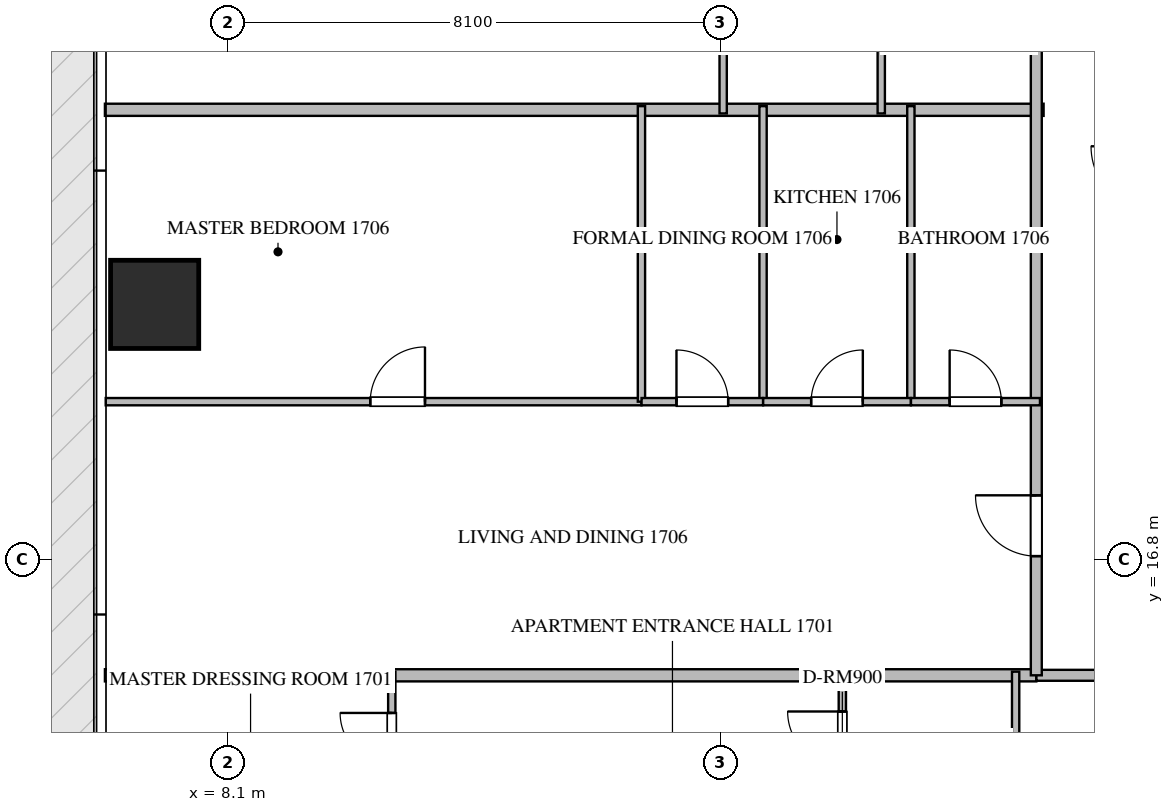
"""IFC4 building model, lengths in metres.
Left out: names, types, materials, properties, quantities, classifications, styles, units other than length and angle.
Written with IfcOpenShell. Run it as: python <this file> out.ifc"""

import sys

from ifc_helpers import new_model, si_unit, direction, frame, frame_2d, origin, origin_2d, place, context, subcontext, project, spatial, rectangle, extrude, source, transform, mapped, element, fill, save


model = new_model("IFC4")
c1 = context("Model", 3, precision=1e-05, world=origin(), true_north=direction((0.0, 1.0)))
c2 = subcontext(c1, "Body", "Model", "MODEL_VIEW")
j1 = project(units=[si_unit("LENGTHUNIT", "METRE"), si_unit("PLANEANGLEUNIT", "RADIAN")], contexts=[c1])
p1 = place(None, origin())
s1 = spatial("IfcSite", under=j1, at=p1, CompositionType="ELEMENT")
p2 = place(p1, origin())
s2 = spatial("IfcBuilding", under=s1, at=p2, CompositionType="ELEMENT")
p3 = place(p2, frame((0.0, 0.0, 71.7)))
s3 = spatial("IfcBuildingStorey", under=s2, at=p3, CompositionType="ELEMENT", Elevation=71.7)
m1 = source(origin(), c2, "Body", "SweptSolid", [
    extrude(rectangle(XDim=1.45, YDim=1.45, at=origin_2d()), origin(), (0.0, 0.0, 1.0), 3.75),
])
p4 = place(p3, frame((6.9, 21.0, -0.26), z_axis=(0.0, 0.0, 1.0), x_axis=(1.0, 0.0, 0.0)))
e1 = element("IfcColumn", 1, at=p4, inside=s3, PredefinedType="COLUMN", context=c2, shape_type="MappedRepresentation", body=[
    mapped(m1, transform((0.0, 0.0, 0.0), scale=1.0)),
])
p5 = place(p3, frame((6.082, 24.2, 0.0), z_axis=(0.0, 0.0, 1.0), x_axis=(1.0, 0.0, 0.0)))
e2 = element("IfcWall", 2, at=p5, inside=s3, PredefinedType="PARTITIONING", context=c2, shape_type="SweptSolid", body=[
    extrude(rectangle(XDim=15.438, YDim=0.2, at=frame_2d((7.719, 0.0))), origin(), (0.0, 0.0, 1.0), 3.49),
])
p6 = place(p3, frame((6.082, 14.9, 0.0), z_axis=(0.0, 0.0, 1.0), x_axis=(1.0, 0.0, 0.0)))
e3 = element("IfcWall", 3, at=p6, inside=s3, PredefinedType="PARTITIONING", context=c2, shape_type="SweptSolid", body=[
    extrude(rectangle(XDim=15.318, YDim=0.2, at=frame_2d((7.659, 0.0))), origin(), (0.0, 0.0, 1.0), 3.49),
])
p7 = place(p3, frame((21.402, 14.9, 0.0), z_axis=(0.0, 0.0, 1.0), x_axis=(1.0, 0.0, 0.0)))
e4 = element("IfcWall", 4, at=p7, inside=s3, PredefinedType="PARTITIONING", context=c2, shape_type="SweptSolid", body=[
    extrude(rectangle(XDim=21.996, YDim=0.18, at=frame_2d((10.998, 0.0))), origin(), (0.0, 0.0, 1.0), 3.49),
])
p8 = place(p7, frame((2.1, 0.0, 0.0)))
e5 = element("IfcOpeningElement", 5, at=p8, cuts=e4, PredefinedType="OPENING", context=c2, shape_type="SweptSolid", body=[
    extrude(rectangle(XDim=1.0, YDim=2.15, at=frame_2d((0.5, 1.075))), frame((0.0, 0.1, 0.0), z_axis=(0.0, -1.0, 0.0), x_axis=(1.0, 0.0, 0.0)), (0.0, 0.0, 1.0), 0.2),
])
p9 = place(p7, frame((6.173, 0.0, 0.0)))
e6 = element("IfcOpeningElement", 6, at=p9, cuts=e4, PredefinedType="OPENING", context=c2, shape_type="SweptSolid", body=[
    extrude(rectangle(XDim=1.0, YDim=2.15, at=frame_2d((0.5, 1.075))), frame((0.0, 0.1, 0.0), z_axis=(0.0, -1.0, 0.0), x_axis=(1.0, 0.0, 0.0)), (0.0, 0.0, 1.0), 0.2),
])
p10 = place(p7, frame((18.896, 0.0, 0.0)))
e7 = element("IfcOpeningElement", 7, at=p10, cuts=e4, PredefinedType="OPENING", context=c2, shape_type="SweptSolid", body=[
    extrude(rectangle(XDim=1.0, YDim=2.15, at=frame_2d((0.5, 1.075))), frame((0.0, 0.1, 0.0), z_axis=(0.0, -1.0, 0.0), x_axis=(1.0, 0.0, 0.0)), (0.0, 0.0, 1.0), 0.2),
])
p11 = place(p3, frame((21.4, 14.9, 0.0), z_axis=(0.0, 0.0, 1.0), x_axis=(0.0, 1.0, 0.0)))
e8 = element("IfcWall", 8, at=p11, inside=s3, PredefinedType="PARTITIONING", context=c2, shape_type="SweptSolid", body=[
    extrude(rectangle(XDim=20.6, YDim=0.18, at=frame_2d((10.3, 0.0))), origin(), (0.0, 0.0, 1.0), 3.49),
])
p12 = place(p11, frame((1.96, 0.0, 0.0)))
e9 = element("IfcOpeningElement", 9, at=p12, cuts=e8, PredefinedType="OPENING", context=c2, shape_type="SweptSolid", body=[
    extrude(rectangle(XDim=1.0, YDim=2.15, at=frame_2d((0.5, 1.075))), frame((0.0, 0.1, 0.0), z_axis=(0.0, -1.0, 0.0), x_axis=(1.0, 0.0, 0.0)), (0.0, 0.0, 1.0), 0.2),
])
p13 = place(p11, frame((15.778, 0.0, 0.0)))
e10 = element("IfcOpeningElement", 10, at=p13, cuts=e8, PredefinedType="OPENING", context=c2, shape_type="SweptSolid", body=[
    extrude(rectangle(XDim=1.0, YDim=2.15, at=frame_2d((0.5, 1.075))), frame((0.0, 0.1, 0.0), z_axis=(0.0, -1.0, 0.0), x_axis=(1.0, 0.0, 0.0)), (0.0, 0.0, 1.0), 0.2),
])
p14 = place(p3, frame((21.06, 12.15, 0.0), z_axis=(0.0, 0.0, 1.0), x_axis=(0.0, 1.0, 0.0)))
e11 = element("IfcWall", 11, at=p14, inside=s3, PredefinedType="PARTITIONING", context=c2, shape_type="SweptSolid", body=[
    extrude(rectangle(XDim=2.81, YDim=0.12, at=frame_2d((1.405, 0.0))), origin(), (0.0, 0.0, 1.0), 3.49),
])
p15 = place(p3, frame((18.21, 12.75, 0.0), z_axis=(0.0, 0.0, 1.0), x_axis=(0.0, 1.0, 0.0)))
e12 = element("IfcWall", 12, at=p15, inside=s3, PredefinedType="PARTITIONING", context=c2, shape_type="SweptSolid", body=[
    extrude(rectangle(XDim=2.21, YDim=0.12, at=frame_2d((1.105, 0.0))), origin(), (0.0, 0.0, 1.0), 3.49),
])
p16 = place(p15, frame((0.655, 0.0, 0.0)))
e13 = element("IfcOpeningElement", 13, at=p16, cuts=e12, PredefinedType="OPENING", context=c2, shape_type="SweptSolid", body=[
    extrude(rectangle(XDim=0.9, YDim=2.1, at=frame_2d((0.45, 1.05))), frame((0.0, 0.07, 0.0), z_axis=(0.0, -1.0, 0.0), x_axis=(1.0, 0.0, 0.0)), (0.0, 0.0, 1.0), 0.14),
])
p17 = place(p3, frame((10.8, 12.752, 0.0), z_axis=(0.0, 0.0, 1.0), x_axis=(0.0, 1.0, 0.0)))
e14 = element("IfcWall", 14, at=p17, inside=s3, PredefinedType="PARTITIONING", context=c2, shape_type="SweptSolid", body=[
    extrude(rectangle(XDim=2.208, YDim=0.12, at=frame_2d((1.104, 0.0))), origin(), (0.0, 0.0, 1.0), 3.49),
])
p18 = place(p17, frame((0.679, 0.0, 0.0)))
e15 = element("IfcOpeningElement", 15, at=p18, cuts=e14, PredefinedType="OPENING", context=c2, shape_type="SweptSolid", body=[
    extrude(rectangle(XDim=0.85, YDim=2.1, at=frame_2d((0.425, 1.05))), frame((0.0, 0.07, 0.0), z_axis=(0.0, -1.0, 0.0), x_axis=(1.0, 0.0, 0.0)), (0.0, 0.0, 1.0), 0.14),
])
p19 = place(p3, frame((6.095, 19.4, 0.0), z_axis=(0.0, 0.0, 1.0), x_axis=(1.0, 0.0, 0.0)))
e16 = element("IfcWall", 16, at=p19, inside=s3, PredefinedType="PARTITIONING", context=c2, shape_type="SweptSolid", body=[
    extrude(rectangle(XDim=8.811, YDim=0.12, at=frame_2d((4.406, 0.0))), origin(), (0.0, 0.0, 1.0), 3.49),
])
p20 = place(p19, frame((4.351, 0.0, 0.0)))
e17 = element("IfcOpeningElement", 17, at=p20, cuts=e16, PredefinedType="OPENING", context=c2, shape_type="SweptSolid", body=[
    extrude(rectangle(XDim=0.9, YDim=2.1, at=frame_2d((0.45, 1.05))), frame((0.0, 0.07, 0.0), z_axis=(0.0, -1.0, 0.0), x_axis=(1.0, 0.0, 0.0)), (0.0, 0.0, 1.0), 0.14),
])
for number, where, z_axis, x_axis in (
    (18, (14.906, 19.4, 0.0), (0.0, 0.0, 1.0), (0.0, 1.0, 0.0)),
    (19, (16.906, 19.4, 0.0), (0.0, 0.0, 1.0), (0.0, 1.0, 0.0)),
    (20, (19.337, 19.4, 0.0), (0.0, 0.0, 1.0), (0.0, 1.0, 0.0)),
):
    element("IfcWall", number, at=place(p3, frame(where, z_axis=z_axis, x_axis=x_axis)), inside=s3, PredefinedType="PARTITIONING", context=c2, shape_type="SweptSolid", body=[
        extrude(rectangle(XDim=4.86, YDim=0.12, at=frame_2d((2.43, 0.0))), origin(), (0.0, 0.0, 1.0), 3.49),
    ])
p21 = place(p3, frame((14.908, 19.4, 0.0), z_axis=(0.0, 0.0, 1.0), x_axis=(1.0, 0.0, 0.0)))
e21 = element("IfcWall", 21, at=p21, inside=s3, PredefinedType="PARTITIONING", context=c2, shape_type="SweptSolid", body=[
    extrude(rectangle(XDim=1.998, YDim=0.12, at=frame_2d((0.999, 0.0))), origin(), (0.0, 0.0, 1.0), 3.49),
])
p22 = place(p21, frame((0.574, 0.0, 0.0)))
e22 = element("IfcOpeningElement", 22, at=p22, cuts=e21, PredefinedType="OPENING", context=c2, shape_type="SweptSolid", body=[
    extrude(rectangle(XDim=0.85, YDim=2.1, at=frame_2d((0.425, 1.05))), frame((0.0, 0.07, 0.0), z_axis=(0.0, -1.0, 0.0), x_axis=(1.0, 0.0, 0.0)), (0.0, 0.0, 1.0), 0.14),
])
p23 = place(p3, frame((16.908, 19.4, 0.0), z_axis=(0.0, 0.0, 1.0), x_axis=(1.0, 0.0, 0.0)))
e23 = element("IfcWall", 23, at=p23, inside=s3, PredefinedType="PARTITIONING", context=c2, shape_type="SweptSolid", body=[
    extrude(rectangle(XDim=2.429, YDim=0.12, at=frame_2d((1.214, 0.0))), origin(), (0.0, 0.0, 1.0), 3.49),
])
p24 = place(p23, frame((0.789, 0.0, 0.0)))
e24 = element("IfcOpeningElement", 24, at=p24, cuts=e23, PredefinedType="OPENING", context=c2, shape_type="SweptSolid", body=[
    extrude(rectangle(XDim=0.85, YDim=2.1, at=frame_2d((0.425, 1.05))), frame((0.0, 0.07, 0.0), z_axis=(0.0, -1.0, 0.0), x_axis=(1.0, 0.0, 0.0)), (0.0, 0.0, 1.0), 0.14),
])
p25 = place(p3, frame((19.339, 19.4, 0.0), z_axis=(0.0, 0.0, 1.0), x_axis=(1.0, 0.0, 0.0)))
e25 = element("IfcWall", 25, at=p25, inside=s3, PredefinedType="PARTITIONING", context=c2, shape_type="SweptSolid", body=[
    extrude(rectangle(XDim=2.121, YDim=0.12, at=frame_2d((1.061, 0.0))), origin(), (0.0, 0.0, 1.0), 3.49),
])
p26 = place(p25, frame((0.636, 0.0, 0.0)))
e26 = element("IfcOpeningElement", 26, at=p26, cuts=e25, PredefinedType="OPENING", context=c2, shape_type="SweptSolid", body=[
    extrude(rectangle(XDim=0.85, YDim=2.1, at=frame_2d((0.425, 1.05))), frame((0.0, 0.07, 0.0), z_axis=(0.0, -1.0, 0.0), x_axis=(1.0, 0.0, 0.0)), (0.0, 0.0, 1.0), 0.14),
])
for number, where, z_axis, x_axis in (
    (27, (18.85, 24.14, 0.0), (0.0, 0.0, 1.0), (0.0, 1.0, 0.0)),
    (28, (16.25, 24.14, 0.0), (0.0, 0.0, 1.0), (0.0, 1.0, 0.0)),
):
    element("IfcWall", number, at=place(p3, frame(where, z_axis=z_axis, x_axis=x_axis)), inside=s3, PredefinedType="PARTITIONING", context=c2, shape_type="SweptSolid", body=[
        extrude(rectangle(XDim=2.81, YDim=0.12, at=frame_2d((1.405, 0.0))), origin(), (0.0, 0.0, 1.0), 3.49),
    ])
m2 = source(origin(), c2, "Body", "SweptSolid", [
    extrude(rectangle(XDim=1.0, YDim=2.15, at=frame_2d((0.5, 1.075))), frame((0.0, 0.025, 0.0), z_axis=(0.0, -1.0, 0.0), x_axis=(1.0, 0.0, 0.0)), (0.0, 0.0, 1.0), 0.05),
])
p27 = place(p12, origin())
e29 = element("IfcDoor", 29, at=p27, inside=s3, OperationType="SINGLE_SWING_RIGHT", PredefinedType="DOOR", context=c2, shape_type="MappedRepresentation", body=[
    mapped(m2, transform((0.0, 0.0, 0.0), scale=1.0)),
])
fill(e9, e29)
m3 = source(origin(), c2, "Body", "SweptSolid", [
    extrude(rectangle(XDim=0.9, YDim=2.1, at=frame_2d((0.45, 1.05))), frame((0.0, 0.025, 0.0), z_axis=(0.0, -1.0, 0.0), x_axis=(1.0, 0.0, 0.0)), (0.0, 0.0, 1.0), 0.05),
])
p28 = place(p16, origin())
e30 = element("IfcDoor", 30, at=p28, inside=s3, OperationType="SINGLE_SWING_RIGHT", PredefinedType="DOOR", context=c2, shape_type="MappedRepresentation", body=[
    mapped(m3, transform((0.0, 0.0, 0.0), scale=1.0)),
])
fill(e13, e30)
m4 = source(origin(), c2, "Body", "SweptSolid", [
    extrude(rectangle(XDim=0.85, YDim=2.1, at=frame_2d((0.425, 1.05))), frame((0.0, 0.025, 0.0), z_axis=(0.0, -1.0, 0.0), x_axis=(1.0, 0.0, 0.0)), (0.0, 0.0, 1.0), 0.05),
])
p29 = place(p18, origin())
e31 = element("IfcDoor", 31, at=p29, inside=s3, OperationType="SINGLE_SWING_RIGHT", PredefinedType="DOOR", context=c2, shape_type="MappedRepresentation", body=[
    mapped(m4, transform((0.0, 0.0, 0.0), scale=1.0)),
])
fill(e15, e31)
p30 = place(p20, origin())
e32 = element("IfcDoor", 32, at=p30, inside=s3, OperationType="SINGLE_SWING_RIGHT", PredefinedType="DOOR", context=c2, shape_type="MappedRepresentation", body=[
    mapped(m3, transform((0.0, 0.0, 0.0), scale=1.0)),
])
fill(e17, e32)
p31 = place(p22, origin())
e33 = element("IfcDoor", 33, at=p31, inside=s3, OperationType="SINGLE_SWING_LEFT", PredefinedType="DOOR", context=c2, shape_type="MappedRepresentation", body=[
    mapped(m4, transform((0.0, 0.0, 0.0), scale=1.0)),
])
fill(e22, e33)
p32 = place(p24, origin())
e34 = element("IfcDoor", 34, at=p32, inside=s3, OperationType="SINGLE_SWING_RIGHT", PredefinedType="DOOR", context=c2, shape_type="MappedRepresentation", body=[
    mapped(m4, transform((0.0, 0.0, 0.0), scale=1.0)),
])
fill(e24, e34)
p33 = place(p26, origin())
e35 = element("IfcDoor", 35, at=p33, inside=s3, OperationType="SINGLE_SWING_LEFT", PredefinedType="DOOR", context=c2, shape_type="MappedRepresentation", body=[
    mapped(m4, transform((0.0, 0.0, 0.0), scale=1.0)),
])
fill(e26, e35)
save(model, sys.argv[1])
